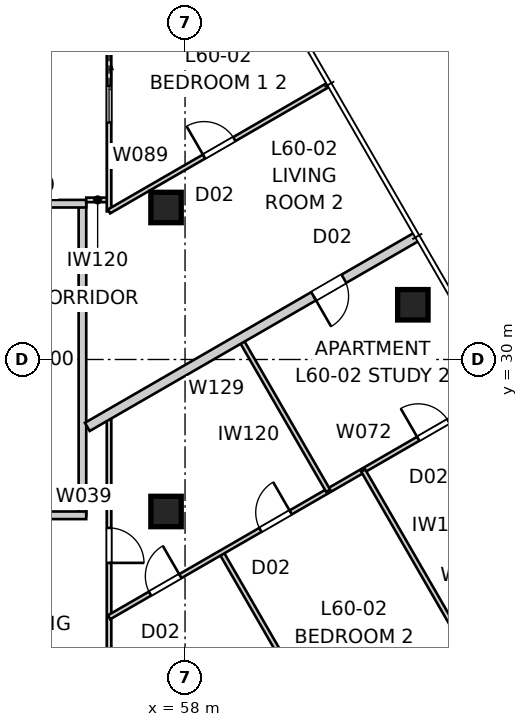
"""IFC4 building model, lengths in metres.
Left out: names, types, materials, properties, quantities, classifications, styles, units other than length and angle.
Written with IfcOpenShell. Run it as: python <this file> out.ifc"""

import sys

from ifc_helpers import new_model, si_unit, direction, frame, frame_2d, origin, origin_2d, place, context, subcontext, project, spatial, rectangle, extrude, element, fill, save


model = new_model("IFC4")
c1 = context("Model", 3, precision=1e-05, world=origin(), true_north=direction((0.0, 1.0)))
c2 = subcontext(c1, "Body", "Model", "MODEL_VIEW")
j1 = project(units=[si_unit("LENGTHUNIT", "METRE"), si_unit("PLANEANGLEUNIT", "RADIAN")], contexts=[c1])
p1 = place(None, origin())
s1 = spatial("IfcSite", under=j1, at=p1, CompositionType="ELEMENT")
p2 = place(p1, origin())
s2 = spatial("IfcBuilding", under=s1, at=p2, CompositionType="ELEMENT")
p3 = place(p2, frame((0.0, 0.0, 218.4)))
s3 = spatial("IfcBuildingStorey", under=s2, at=p3, CompositionType="ELEMENT", Elevation=218.4)
for number, where, z_axis, x_axis in (
    (1, (63.995, 31.44, 0.0), (0.0, 0.0, 1.0), (1.0, 0.0, 0.0)),
    (2, (57.5, 26.0, 0.0), (0.0, 0.0, 1.0), (1.0, 0.0, 0.0)),
    (3, (57.5, 34.0, 0.0), (0.0, 0.0, 1.0), (1.0, 0.0, 0.0)),
):
    element("IfcColumn", number, at=place(p3, frame(where, z_axis=z_axis, x_axis=x_axis)), inside=s3, PredefinedType="COLUMN", context=c2, shape_type="SweptSolid", body=[
        extrude(rectangle(XDim=0.8, YDim=0.8, at=origin_2d()), origin(), (0.0, 0.0, 1.0), 3.4),
    ])
p4 = place(p3, frame((55.3, 25.9, 0.0), z_axis=(0.0, 0.0, 1.0), x_axis=(0.0, 1.0, 0.0)))
e4 = element("IfcWall", 4, at=p4, inside=s3, PredefinedType="PARTITIONING", context=c2, shape_type="SweptSolid", body=[
    extrude(rectangle(XDim=8.2, YDim=0.2, at=frame_2d((4.1, 0.0))), origin(), (0.0, 0.0, 1.0), 3.25),
])
p5 = place(p3, frame((52.1, 34.1, 0.0), z_axis=(0.0, 0.0, 1.0), x_axis=(1.0, 0.0, 0.0)))
e5 = element("IfcWall", 5, at=p5, inside=s3, PredefinedType="PARTITIONING", context=c2, shape_type="SweptSolid", body=[
    extrude(rectangle(XDim=3.3, YDim=0.2, at=frame_2d((1.65, 0.0))), origin(), (0.0, 0.0, 1.0), 3.25),
])
p6 = place(p3, frame((52.1, 25.9, 0.0), z_axis=(0.0, 0.0, 1.0), x_axis=(1.0, 0.0, 0.0)))
e6 = element("IfcWall", 6, at=p6, inside=s3, PredefinedType="PARTITIONING", context=c2, shape_type="SweptSolid", body=[
    extrude(rectangle(XDim=3.3, YDim=0.2, at=frame_2d((1.65, 0.0))), origin(), (0.0, 0.0, 1.0), 3.25),
])
p7 = place(p6, frame((1.04, 0.0, 0.0)))
e7 = element("IfcOpeningElement", 7, at=p7, cuts=e6, PredefinedType="OPENING", context=c2, shape_type="SweptSolid", body=[
    extrude(rectangle(XDim=1.02, YDim=2.34, at=frame_2d((0.51, 1.17))), frame((0.0, 0.11, 0.0), z_axis=(0.0, -1.0, 0.0), x_axis=(1.0, 0.0, 0.0)), (0.0, 0.0, 1.0), 0.22),
])
p8 = place(p3, frame((59.486, 41.25, 0.0), z_axis=(0.0, 0.0, 1.0), x_axis=(-0.866020489494, -0.500008511703, 0.0)))
e8 = element("IfcWall", 8, at=p8, inside=s3, PredefinedType="PARTITIONING", context=c2, shape_type="SweptSolid", body=[
    extrude(rectangle(XDim=8.496, YDim=0.25, at=frame_2d((4.248, 0.0))), origin(), (0.0, 0.0, 1.0), 3.25),
])
p9 = place(p3, frame((64.111, 33.239, 0.0), z_axis=(0.0, 0.0, 1.0), x_axis=(-0.866024190901, -0.50000210077, 0.0)))
e9 = element("IfcWall", 9, at=p9, inside=s3, PredefinedType="PARTITIONING", context=c2, shape_type="SweptSolid", body=[
    extrude(rectangle(XDim=10.026, YDim=0.25, at=frame_2d((5.013, 0.0))), origin(), (0.0, 0.0, 1.0), 3.25),
])
p10 = place(p9, frame((2.229, 0.0, 0.0)))
e10 = element("IfcOpeningElement", 10, at=p10, cuts=e9, PredefinedType="OPENING", context=c2, shape_type="SweptSolid", body=[
    extrude(rectangle(XDim=0.92, YDim=2.34, at=frame_2d((0.46, 1.17))), frame((0.0, 0.135, 0.0), z_axis=(0.0, -1.0, 0.0), x_axis=(1.0, 0.0, 0.0)), (0.0, 0.0, 1.0), 0.27),
])
p11 = place(p3, frame((56.0, 28.557, 0.0), z_axis=(0.0, 0.0, 1.0), x_axis=(0.0, -1.0, 0.0)))
e11 = element("IfcWall", 11, at=p11, inside=s3, PredefinedType="PARTITIONING", context=c2, shape_type="SweptSolid", body=[
    extrude(rectangle(XDim=10.601, YDim=0.12, at=frame_2d((5.3, 0.0))), origin(), (0.0, 0.0, 1.0), 2.55),
])
p12 = place(p11, frame((2.989, 0.0, 0.0)))
e12 = element("IfcOpeningElement", 12, at=p12, cuts=e11, PredefinedType="OPENING", context=c2, shape_type="SweptSolid", body=[
    extrude(rectangle(XDim=0.92, YDim=2.34, at=frame_2d((0.46, 1.17))), frame((0.0, 0.07, 0.0), z_axis=(0.0, -1.0, 0.0), x_axis=(1.0, 0.0, 0.0)), (0.0, 0.0, 1.0), 0.14),
])
p13 = place(p3, frame((58.954, 24.921, 0.0), z_axis=(0.0, 0.0, 1.0), x_axis=(0.49999898161, -0.866025991751, 0.0)))
e13 = element("IfcWall", 13, at=p13, inside=s3, PredefinedType="PARTITIONING", context=c2, shape_type="SweptSolid", body=[
    extrude(rectangle(XDim=8.585, YDim=0.12, at=frame_2d((4.292, 0.0))), origin(), (0.0, 0.0, 1.0), 3.25),
])
p14 = place(p3, frame((56.0, 23.216, 0.0), z_axis=(0.0, 0.0, 1.0), x_axis=(0.866023917076, 0.500002575046, 0.0)))
e14 = element("IfcWall", 14, at=p14, inside=s3, PredefinedType="PARTITIONING", context=c2, shape_type="SweptSolid", body=[
    extrude(rectangle(XDim=11.996, YDim=0.12, at=frame_2d((5.998, 0.0))), origin(), (0.0, 0.0, 1.0), 3.25),
])
p15 = place(p14, frame((1.245, 0.0, 0.0)))
e15 = element("IfcOpeningElement", 15, at=p15, cuts=e14, PredefinedType="OPENING", context=c2, shape_type="SweptSolid", body=[
    extrude(rectangle(XDim=0.92, YDim=2.34, at=frame_2d((0.46, 1.17))), frame((0.0, 0.07, 0.0), z_axis=(0.0, -1.0, 0.0), x_axis=(1.0, 0.0, 0.0)), (0.0, 0.0, 1.0), 0.14),
])
p16 = place(p14, frame((4.599, 0.0, 0.0)))
e16 = element("IfcOpeningElement", 16, at=p16, cuts=e14, PredefinedType="OPENING", context=c2, shape_type="SweptSolid", body=[
    extrude(rectangle(XDim=0.92, YDim=2.34, at=frame_2d((0.46, 1.17))), frame((0.0, 0.07, 0.0), z_axis=(0.0, -1.0, 0.0), x_axis=(1.0, 0.0, 0.0)), (0.0, 0.0, 1.0), 0.14),
])
p17 = place(p14, frame((9.394, 0.0, 0.0)))
e17 = element("IfcOpeningElement", 17, at=p17, cuts=e14, PredefinedType="OPENING", context=c2, shape_type="SweptSolid", body=[
    extrude(rectangle(XDim=0.92, YDim=2.34, at=frame_2d((0.46, 1.17))), frame((0.0, 0.07, 0.0), z_axis=(0.0, -1.0, 0.0), x_axis=(1.0, 0.0, 0.0)), (0.0, 0.0, 1.0), 0.14),
])
p18 = place(p3, frame((62.688, 27.078, 0.0), z_axis=(0.0, 0.0, 1.0), x_axis=(0.500007885066, -0.866020851292, 0.0)))
e18 = element("IfcWall", 18, at=p18, inside=s3, PredefinedType="PARTITIONING", context=c2, shape_type="SweptSolid", body=[
    extrude(rectangle(XDim=4.615, YDim=0.12, at=frame_2d((2.308, 0.0))), origin(), (0.0, 0.0, 1.0), 3.25),
])
p19 = place(p3, frame((61.766, 26.545, 0.0), z_axis=(0.0, 0.0, 1.0), x_axis=(-0.499999662836, 0.866025598446, 0.0)))
e19 = element("IfcWall", 19, at=p19, inside=s3, PredefinedType="PARTITIONING", context=c2, shape_type="SweptSolid", body=[
    extrude(rectangle(XDim=4.625, YDim=0.12, at=frame_2d((2.312, 0.0))), origin(), (0.0, 0.0, 1.0), 3.25),
])
p20 = place(p3, frame((56.0, 34.2, 0.0), z_axis=(0.0, 0.0, 1.0), x_axis=(-1.0, 0.0, 0.0)))
e20 = element("IfcWall", 20, at=p20, inside=s3, PredefinedType="PARTITIONING", context=c2, shape_type="SweptSolid", body=[
    extrude(rectangle(XDim=0.6, YDim=0.12, at=frame_2d((0.3, 0.0))), origin(), (0.0, 0.0, 1.0), 3.25),
])
p21 = place(p3, frame((56.0, 44.578, 0.0), z_axis=(0.0, 0.0, 1.0), x_axis=(0.0, -1.0, 0.0)))
e21 = element("IfcWall", 21, at=p21, inside=s3, PredefinedType="PARTITIONING", context=c2, shape_type="SweptSolid", body=[
    extrude(rectangle(XDim=10.681, YDim=0.12, at=frame_2d((5.34, 0.0))), origin(), (0.0, 0.0, 1.0), 2.55),
])
p22 = place(p21, frame((0.77, 0.0, 0.0)))
e22 = element("IfcOpeningElement", 22, at=p22, cuts=e21, PredefinedType="OPENING", context=c2, shape_type="SweptSolid", body=[
    extrude(rectangle(XDim=0.96, YDim=2.1, at=frame_2d((0.48, 1.05))), frame((0.0, 0.07, 0.0), z_axis=(0.0, -1.0, 0.0), x_axis=(1.0, 0.0, 0.0)), (0.0, 0.0, 1.0), 0.14),
])
p23 = place(p21, frame((7.379, 0.0, 0.0)))
e23 = element("IfcOpeningElement", 23, at=p23, cuts=e21, PredefinedType="OPENING", context=c2, shape_type="SweptSolid", body=[
    extrude(rectangle(XDim=0.96, YDim=2.1, at=frame_2d((0.48, 1.05))), frame((0.0, 0.07, 0.0), z_axis=(0.0, -1.0, 0.0), x_axis=(1.0, 0.0, 0.0)), (0.0, 0.0, 1.0), 0.14),
])
p24 = place(p3, frame((56.0, 33.897, 0.0), z_axis=(0.0, 0.0, 1.0), x_axis=(0.866033470286, 0.49998602815, 0.0)))
e24 = element("IfcWall", 24, at=p24, inside=s3, PredefinedType="PARTITIONING", context=c2, shape_type="SweptSolid", body=[
    extrude(rectangle(XDim=6.655, YDim=0.12, at=frame_2d((3.328, 0.0))), origin(), (0.0, 0.0, 1.0), 3.25),
])
p25 = place(p24, frame((2.887, 0.0, 0.0)))
e25 = element("IfcOpeningElement", 25, at=p25, cuts=e24, PredefinedType="OPENING", context=c2, shape_type="SweptSolid", body=[
    extrude(rectangle(XDim=0.92, YDim=2.34, at=frame_2d((0.46, 1.17))), frame((0.0, 0.07, 0.0), z_axis=(0.0, -1.0, 0.0), x_axis=(1.0, 0.0, 0.0)), (0.0, 0.0, 1.0), 0.14),
])
p26 = place(p12, origin())
e26 = element("IfcDoor", 26, at=p26, inside=s3, OperationType="SINGLE_SWING_RIGHT", PredefinedType="DOOR", context=c2, shape_type="SweptSolid", body=[
    extrude(rectangle(XDim=0.92, YDim=2.34, at=frame_2d((0.46, 1.17))), frame((0.0, 0.025, 0.0), z_axis=(0.0, -1.0, 0.0), x_axis=(1.0, 0.0, 0.0)), (0.0, 0.0, 1.0), 0.05),
])
fill(e12, e26)
p27 = place(p25, origin())
e27 = element("IfcDoor", 27, at=p27, inside=s3, OperationType="SINGLE_SWING_LEFT", PredefinedType="DOOR", context=c2, shape_type="SweptSolid", body=[
    extrude(rectangle(XDim=0.92, YDim=2.34, at=frame_2d((0.46, 1.17))), frame((0.0, 0.025, 0.0), z_axis=(0.0, -1.0, 0.0), x_axis=(1.0, 0.0, 0.0)), (0.0, 0.0, 1.0), 0.05),
])
fill(e25, e27)
p28 = place(p10, origin())
e28 = element("IfcDoor", 28, at=p28, inside=s3, OperationType="SINGLE_SWING_RIGHT", PredefinedType="DOOR", context=c2, shape_type="SweptSolid", body=[
    extrude(rectangle(XDim=0.92, YDim=2.34, at=frame_2d((0.46, 1.17))), frame((0.0, 0.025, 0.0), z_axis=(0.0, -1.0, 0.0), x_axis=(1.0, 0.0, 0.0)), (0.0, 0.0, 1.0), 0.05),
])
fill(e10, e28)
p29 = place(p15, origin())
e29 = element("IfcDoor", 29, at=p29, inside=s3, OperationType="SINGLE_SWING_RIGHT", PredefinedType="DOOR", context=c2, shape_type="SweptSolid", body=[
    extrude(rectangle(XDim=0.92, YDim=2.34, at=frame_2d((0.46, 1.17))), frame((0.0, 0.025, 0.0), z_axis=(0.0, -1.0, 0.0), x_axis=(1.0, 0.0, 0.0)), (0.0, 0.0, 1.0), 0.05),
])
fill(e15, e29)
p30 = place(p16, origin())
e30 = element("IfcDoor", 30, at=p30, inside=s3, OperationType="SINGLE_SWING_RIGHT", PredefinedType="DOOR", context=c2, shape_type="SweptSolid", body=[
    extrude(rectangle(XDim=0.92, YDim=2.34, at=frame_2d((0.46, 1.17))), frame((0.0, 0.025, 0.0), z_axis=(0.0, -1.0, 0.0), x_axis=(1.0, 0.0, 0.0)), (0.0, 0.0, 1.0), 0.05),
])
fill(e16, e30)
p31 = place(p17, origin())
e31 = element("IfcDoor", 31, at=p31, inside=s3, OperationType="SINGLE_SWING_LEFT", PredefinedType="DOOR", context=c2, shape_type="SweptSolid", body=[
    extrude(rectangle(XDim=0.92, YDim=2.34, at=frame_2d((0.46, 1.17))), frame((0.0, 0.025, 0.0), z_axis=(0.0, -1.0, 0.0), x_axis=(1.0, 0.0, 0.0)), (0.0, 0.0, 1.0), 0.05),
])
fill(e17, e31)
p32 = place(p23, origin())
e32 = element("IfcDoor", 32, at=p32, inside=s3, OperationType="SLIDING_TO_LEFT", PredefinedType="DOOR", context=c2, shape_type="SweptSolid", body=[
    extrude(rectangle(XDim=0.96, YDim=2.1, at=frame_2d((0.48, 1.05))), frame((0.0, 0.025, 0.0), z_axis=(0.0, -1.0, 0.0), x_axis=(1.0, 0.0, 0.0)), (0.0, 0.0, 1.0), 0.05),
])
fill(e23, e32)
save(model, sys.argv[1])
